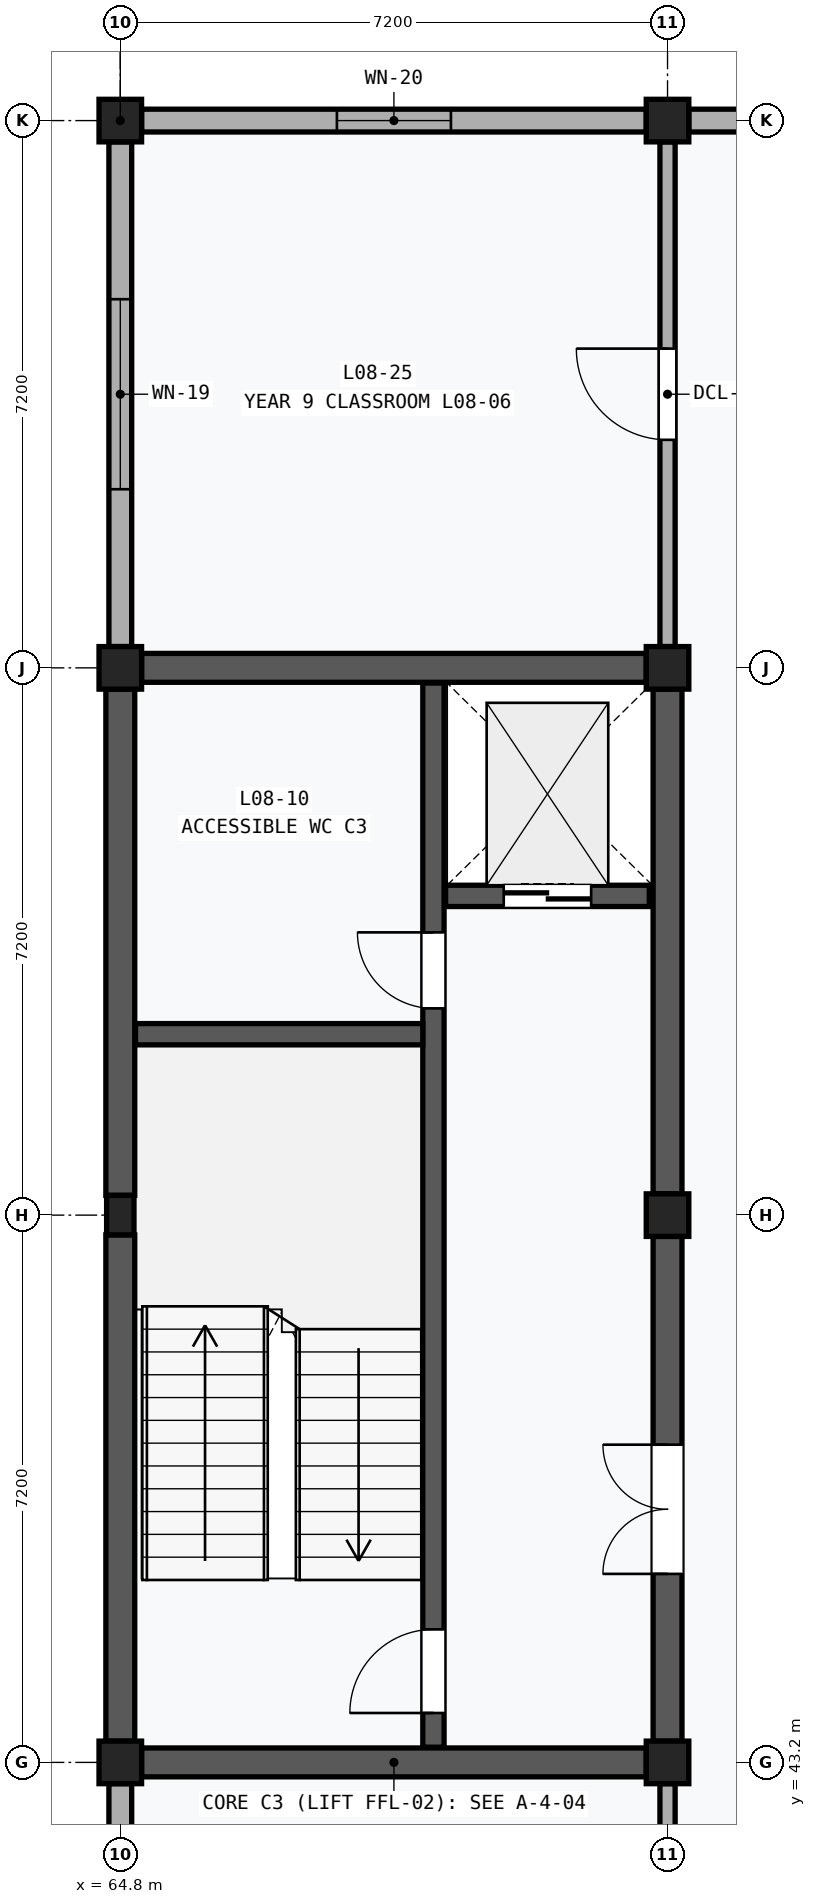
"""IFC4 building model, lengths in metres.
Left out: names, types, materials, properties, quantities, classifications, styles, units other than length and angle.
Written with IfcOpenShell. Run it as: python <this file> out.ifc"""

import sys

from ifc_helpers import new_model, si_unit, direction, frame, frame_2d, origin, origin_2d, place, context, subcontext, project, spatial, rectangle, extrude, element, fill, save


model = new_model("IFC4")
c1 = context("Model", 3, precision=1e-05, world=origin(), true_north=direction((0.0, 1.0)))
c2 = subcontext(c1, "Body", "Model", "MODEL_VIEW")
j1 = project(units=[si_unit("LENGTHUNIT", "METRE"), si_unit("PLANEANGLEUNIT", "RADIAN")], contexts=[c1])
p1 = place(None, origin())
s1 = spatial("IfcSite", under=j1, at=p1, CompositionType="ELEMENT")
p2 = place(p1, origin())
s2 = spatial("IfcBuilding", under=s1, at=p2, CompositionType="ELEMENT")
p3 = place(p2, frame((0.0, 0.0, 34.8)))
s3 = spatial("IfcBuildingStorey", under=s2, at=p3, CompositionType="ELEMENT", Elevation=34.8)
p4 = place(p3, frame((64.8, 43.2, 0.0), z_axis=(0.0, 0.0, 1.0), x_axis=(1.0, 0.0, 0.0)))
e1 = element("IfcColumn", 1, at=p4, inside=s3, PredefinedType="COLUMN", context=c2, shape_type="SweptSolid", body=[
    extrude(rectangle(XDim=0.56, YDim=0.56, at=origin_2d()), origin(), (0.0, 0.0, 1.0), 4.0),
])
p5 = place(p3, frame((64.8, 50.4, 0.0), z_axis=(0.0, 0.0, 1.0), x_axis=(1.0, 0.0, 0.0)))
e2 = element("IfcColumn", 2, at=p5, inside=s3, PredefinedType="PILASTER", context=c2, shape_type="SweptSolid", body=[
    extrude(rectangle(XDim=0.36, YDim=0.52, at=origin_2d()), origin(), (0.0, 0.0, 1.0), 4.0),
])
for number, where, z_axis, x_axis in (
    (3, (64.8, 57.6, 0.0), (0.0, 0.0, 1.0), (1.0, 0.0, 0.0)),
    (4, (64.8, 64.8, 0.0), (0.0, 0.0, 1.0), (1.0, 0.0, 0.0)),
    (5, (72.0, 43.2, 0.0), (0.0, 0.0, 1.0), (1.0, 0.0, 0.0)),
    (6, (72.0, 50.4, 0.0), (0.0, 0.0, 1.0), (1.0, 0.0, 0.0)),
    (7, (72.0, 57.6, 0.0), (0.0, 0.0, 1.0), (1.0, 0.0, 0.0)),
    (8, (72.0, 64.8, 0.0), (0.0, 0.0, 1.0), (1.0, 0.0, 0.0)),
):
    element("IfcColumn", number, at=place(p3, frame(where, z_axis=z_axis, x_axis=x_axis)), inside=s3, PredefinedType="COLUMN", context=c2, shape_type="SweptSolid", body=[
        extrude(rectangle(XDim=0.56, YDim=0.56, at=origin_2d()), origin(), (0.0, 0.0, 1.0), 4.0),
    ])
p6 = place(p3, frame((64.8, 36.28, 0.0), z_axis=(0.0, 0.0, 1.0), x_axis=(0.0, 1.0, 0.0)))
e9 = element("IfcWall", 9, at=p6, inside=s3, PredefinedType="SOLIDWALL", context=c2, shape_type="SweptSolid", body=[
    extrude(rectangle(XDim=6.64, YDim=0.3, at=frame_2d((3.32, 0.0))), origin(), (0.0, 0.0, 1.0), 3.19),
])
p7 = place(p3, frame((65.08, 64.8, 0.0), z_axis=(0.0, 0.0, 1.0), x_axis=(1.0, 0.0, 0.0)))
e10 = element("IfcWall", 10, at=p7, inside=s3, PredefinedType="SOLIDWALL", context=c2, shape_type="SweptSolid", body=[
    extrude(rectangle(XDim=6.64, YDim=0.3, at=frame_2d((3.32, 0.0))), origin(), (0.0, 0.0, 1.0), 3.19),
])
p8 = place(p7, frame((2.57, 0.0, 1.2)))
e11 = element("IfcOpeningElement", 11, at=p8, cuts=e10, PredefinedType="OPENING", context=c2, shape_type="SweptSolid", body=[
    extrude(rectangle(XDim=1.5, YDim=1.35, at=frame_2d((0.75, 0.675))), frame((0.0, 0.162, 0.0), z_axis=(0.0, -1.0, 0.0), x_axis=(1.0, 0.0, 0.0)), (0.0, 0.0, 1.0), 0.324),
])
p9 = place(p3, frame((64.8, 57.88, 0.0), z_axis=(0.0, 0.0, 1.0), x_axis=(0.0, 1.0, 0.0)))
e12 = element("IfcWall", 12, at=p9, inside=s3, PredefinedType="SOLIDWALL", context=c2, shape_type="SweptSolid", body=[
    extrude(rectangle(XDim=6.64, YDim=0.3, at=frame_2d((3.32, 0.0))), origin(), (0.0, 0.0, 1.0), 3.19),
])
p10 = place(p9, frame((2.07, 0.0, 1.1)))
e13 = element("IfcOpeningElement", 13, at=p10, cuts=e12, PredefinedType="OPENING", context=c2, shape_type="SweptSolid", body=[
    extrude(rectangle(XDim=2.5, YDim=1.5, at=frame_2d((1.25, 0.75))), frame((0.0, 0.162, 0.0), z_axis=(0.0, -1.0, 0.0), x_axis=(1.0, 0.0, 0.0)), (0.0, 0.0, 1.0), 0.324),
])
p11 = place(p3, frame((72.28, 64.8, 0.0), z_axis=(0.0, 0.0, 1.0), x_axis=(1.0, 0.0, 0.0)))
e14 = element("IfcWall", 14, at=p11, inside=s3, PredefinedType="SOLIDWALL", context=c2, shape_type="SweptSolid", body=[
    extrude(rectangle(XDim=6.74, YDim=0.3, at=frame_2d((3.37, 0.0))), origin(), (0.0, 0.0, 1.0), 3.19),
])
p12 = place(p11, frame((2.495, 0.0, 1.2)))
e15 = element("IfcOpeningElement", 15, at=p12, cuts=e14, PredefinedType="OPENING", context=c2, shape_type="SweptSolid", body=[
    extrude(rectangle(XDim=1.75, YDim=1.35, at=frame_2d((0.875, 0.675))), frame((0.0, 0.162, 0.0), z_axis=(0.0, -1.0, 0.0), x_axis=(1.0, 0.0, 0.0)), (0.0, 0.0, 1.0), 0.324),
])
p13 = place(p3, frame((64.8, 43.48, 0.0), z_axis=(0.0, 0.0, 1.0), x_axis=(0.0, 1.0, 0.0)))
e16 = element("IfcWall", 16, at=p13, inside=s3, PredefinedType="SHEAR", context=c2, shape_type="SweptSolid", body=[
    extrude(rectangle(XDim=6.66, YDim=0.38, at=frame_2d((3.33, 0.0))), origin(), (0.0, 0.0, 1.0), 3.19),
])
p14 = place(p3, frame((64.8, 50.66, 0.0), z_axis=(0.0, 0.0, 1.0), x_axis=(0.0, 1.0, 0.0)))
e17 = element("IfcWall", 17, at=p14, inside=s3, PredefinedType="SHEAR", context=c2, shape_type="SweptSolid", body=[
    extrude(rectangle(XDim=6.66, YDim=0.38, at=frame_2d((3.33, 0.0))), origin(), (0.0, 0.0, 1.0), 3.19),
])
p15 = place(p3, frame((72.0, 43.48, 0.0), z_axis=(0.0, 0.0, 1.0), x_axis=(0.0, 1.0, 0.0)))
e18 = element("IfcWall", 18, at=p15, inside=s3, PredefinedType="SHEAR", context=c2, shape_type="SweptSolid", body=[
    extrude(rectangle(XDim=6.64, YDim=0.38, at=frame_2d((3.32, 0.0))), origin(), (0.0, 0.0, 1.0), 3.03),
])
p16 = place(p15, frame((2.2, 0.0, 0.0)))
e19 = element("IfcOpeningElement", 19, at=p16, cuts=e18, PredefinedType="OPENING", context=c2, shape_type="SweptSolid", body=[
    extrude(rectangle(XDim=1.7, YDim=2.25, at=frame_2d((0.85, 1.125))), frame((0.0, 0.202, 0.0), z_axis=(0.0, -1.0, 0.0), x_axis=(1.0, 0.0, 0.0)), (0.0, 0.0, 1.0), 0.404),
])
p17 = place(p3, frame((72.0, 50.68, 0.0), z_axis=(0.0, 0.0, 1.0), x_axis=(0.0, 1.0, 0.0)))
e20 = element("IfcWall", 20, at=p17, inside=s3, PredefinedType="SHEAR", context=c2, shape_type="SweptSolid", body=[
    extrude(rectangle(XDim=6.64, YDim=0.38, at=frame_2d((3.32, 0.0))), origin(), (0.0, 0.0, 1.0), 3.03),
])
for number, where, z_axis, x_axis in (
    (21, (65.08, 43.2, 0.0), (0.0, 0.0, 1.0), (1.0, 0.0, 0.0)),
    (22, (65.08, 57.6, 0.0), (0.0, 0.0, 1.0), (1.0, 0.0, 0.0)),
):
    element("IfcWall", number, at=place(p3, frame(where, z_axis=z_axis, x_axis=x_axis)), inside=s3, PredefinedType="SHEAR", context=c2, shape_type="SweptSolid", body=[
        extrude(rectangle(XDim=6.64, YDim=0.38, at=frame_2d((3.32, 0.0))), origin(), (0.0, 0.0, 1.0), 3.03),
    ])
p18 = place(p3, frame((68.92, 43.4, 0.0), z_axis=(0.0, 0.0, 1.0), x_axis=(0.0, 1.0, 0.0)))
e23 = element("IfcWall", 23, at=p18, inside=s3, PredefinedType="SHEAR", context=c2, shape_type="SweptSolid", body=[
    extrude(rectangle(XDim=14.0, YDim=0.28, at=frame_2d((7.0, 0.0))), origin(), (0.0, 0.0, 1.0), 3.76),
])
p19 = place(p18, frame((0.45, 0.0, 0.0)))
e24 = element("IfcOpeningElement", 24, at=p19, cuts=e23, PredefinedType="OPENING", context=c2, shape_type="SweptSolid", body=[
    extrude(rectangle(XDim=1.1, YDim=2.15, at=frame_2d((0.55, 1.075))), frame((0.0, 0.152, 0.0), z_axis=(0.0, -1.0, 0.0), x_axis=(1.0, 0.0, 0.0)), (0.0, 0.0, 1.0), 0.304),
])
p20 = place(p18, frame((9.72, 0.0, 0.0)))
e25 = element("IfcOpeningElement", 25, at=p20, cuts=e23, PredefinedType="OPENING", context=c2, shape_type="SweptSolid", body=[
    extrude(rectangle(XDim=1.0, YDim=2.15, at=frame_2d((0.5, 1.075))), frame((0.0, 0.152, 0.0), z_axis=(0.0, -1.0, 0.0), x_axis=(1.0, 0.0, 0.0)), (0.0, 0.0, 1.0), 0.304),
])
p21 = place(p3, frame((65.0, 52.78, 0.0), z_axis=(0.0, 0.0, 1.0), x_axis=(1.0, 0.0, 0.0)))
e26 = element("IfcWall", 26, at=p21, inside=s3, PredefinedType="SHEAR", context=c2, shape_type="SweptSolid", body=[
    extrude(rectangle(XDim=3.78, YDim=0.28, at=frame_2d((1.89, 0.0))), origin(), (0.0, 0.0, 1.0), 3.76),
])
p22 = place(p3, frame((69.08, 54.6, 0.0), z_axis=(0.0, 0.0, 1.0), x_axis=(1.0, 0.0, 0.0)))
e27 = element("IfcWall", 27, at=p22, inside=s3, PredefinedType="SHEAR", context=c2, shape_type="SweptSolid", body=[
    extrude(rectangle(XDim=2.68, YDim=0.28, at=frame_2d((1.34, 0.0))), origin(), (0.0, 0.0, 1.0), 3.76),
])
p23 = place(p22, frame((0.765, 0.0, 0.0)))
e28 = element("IfcOpeningElement", 28, at=p23, cuts=e27, PredefinedType="OPENING", context=c2, shape_type="SweptSolid", body=[
    extrude(rectangle(XDim=1.15, YDim=2.2, at=frame_2d((0.575, 1.1))), frame((0.0, 0.152, 0.0), z_axis=(0.0, -1.0, 0.0), x_axis=(1.0, 0.0, 0.0)), (0.0, 0.0, 1.0), 0.304),
])
p24 = place(p3, frame((72.0, 36.28, 0.0), z_axis=(0.0, 0.0, 1.0), x_axis=(0.0, 1.0, 0.0)))
e29 = element("IfcWall", 29, at=p24, inside=s3, PredefinedType="PARTITIONING", context=c2, shape_type="SweptSolid", body=[
    extrude(rectangle(XDim=6.64, YDim=0.2, at=frame_2d((3.32, 0.0))), origin(), (0.0, 0.0, 1.0), 3.03),
])
p25 = place(p3, frame((72.0, 57.88, 0.0), z_axis=(0.0, 0.0, 1.0), x_axis=(0.0, 1.0, 0.0)))
e30 = element("IfcWall", 30, at=p25, inside=s3, PredefinedType="PARTITIONING", context=c2, shape_type="SweptSolid", body=[
    extrude(rectangle(XDim=6.64, YDim=0.2, at=frame_2d((3.32, 0.0))), origin(), (0.0, 0.0, 1.0), 3.03),
])
p26 = place(p25, frame((2.72, 0.0, 0.0)))
e31 = element("IfcOpeningElement", 31, at=p26, cuts=e30, PredefinedType="OPENING", context=c2, shape_type="SweptSolid", body=[
    extrude(rectangle(XDim=1.2, YDim=2.24, at=frame_2d((0.6, 1.12))), frame((0.0, 0.112, 0.0), z_axis=(0.0, -1.0, 0.0), x_axis=(1.0, 0.0, 0.0)), (0.0, 0.0, 1.0), 0.224),
])
p27 = place(p8, origin())
e32 = element("IfcWindow", 32, at=p27, inside=s3, PartitioningType="SINGLE_PANEL", PredefinedType="WINDOW", context=c2, shape_type="SweptSolid", body=[
    extrude(rectangle(XDim=1.5, YDim=1.35, at=frame_2d((0.75, 0.675))), frame((0.0, 0.03, 0.0), z_axis=(0.0, -1.0, 0.0), x_axis=(1.0, 0.0, 0.0)), (0.0, 0.0, 1.0), 0.06),
])
fill(e11, e32)
p28 = place(p10, origin())
e33 = element("IfcWindow", 33, at=p28, inside=s3, PartitioningType="SINGLE_PANEL", PredefinedType="WINDOW", context=c2, shape_type="SweptSolid", body=[
    extrude(rectangle(XDim=2.5, YDim=1.5, at=frame_2d((1.25, 0.75))), frame((0.0, 0.03, 0.0), z_axis=(0.0, -1.0, 0.0), x_axis=(1.0, 0.0, 0.0)), (0.0, 0.0, 1.0), 0.06),
])
fill(e13, e33)
p29 = place(p16, origin())
e34 = element("IfcDoor", 34, at=p29, inside=s3, OperationType="DOUBLE_DOOR_SINGLE_SWING", PredefinedType="DOOR", context=c2, shape_type="SweptSolid", body=[
    extrude(rectangle(XDim=1.7, YDim=2.25, at=frame_2d((0.85, 1.125))), frame((0.0, 0.025, 0.0), z_axis=(0.0, -1.0, 0.0), x_axis=(1.0, 0.0, 0.0)), (0.0, 0.0, 1.0), 0.05),
])
fill(e19, e34)
p30 = place(p19, origin())
e35 = element("IfcDoor", 35, at=p30, inside=s3, OperationType="SINGLE_SWING_LEFT", PredefinedType="DOOR", context=c2, shape_type="SweptSolid", body=[
    extrude(rectangle(XDim=1.1, YDim=2.15, at=frame_2d((0.55, 1.075))), frame((0.0, 0.025, 0.0), z_axis=(0.0, -1.0, 0.0), x_axis=(1.0, 0.0, 0.0)), (0.0, 0.0, 1.0), 0.05),
])
fill(e24, e35)
p31 = place(p20, origin())
e36 = element("IfcDoor", 36, at=p31, inside=s3, OperationType="SINGLE_SWING_RIGHT", PredefinedType="DOOR", context=c2, shape_type="SweptSolid", body=[
    extrude(rectangle(XDim=1.0, YDim=2.15, at=frame_2d((0.5, 1.075))), frame((0.0, 0.025, 0.0), z_axis=(0.0, -1.0, 0.0), x_axis=(1.0, 0.0, 0.0)), (0.0, 0.0, 1.0), 0.05),
])
fill(e25, e36)
p32 = place(p23, frame((1.15, 0.0, 0.0), z_axis=(0.0, 0.0, 1.0), x_axis=(-1.0, 0.0, 0.0)))
e37 = element("IfcDoor", 37, at=p32, inside=s3, OperationType="DOUBLE_DOOR_SLIDING", PredefinedType="DOOR", context=c2, shape_type="SweptSolid", body=[
    extrude(rectangle(XDim=1.15, YDim=2.2, at=frame_2d((0.575, 1.1))), frame((0.0, 0.025, 0.0), z_axis=(0.0, -1.0, 0.0), x_axis=(1.0, 0.0, 0.0)), (0.0, 0.0, 1.0), 0.05),
])
fill(e28, e37)
p33 = place(p26, origin())
e38 = element("IfcDoor", 38, at=p33, inside=s3, OperationType="SINGLE_SWING_RIGHT", PredefinedType="DOOR", context=c2, shape_type="SweptSolid", body=[
    extrude(rectangle(XDim=1.2, YDim=2.24, at=frame_2d((0.6, 1.12))), frame((0.0, 0.025, 0.0), z_axis=(0.0, -1.0, 0.0), x_axis=(1.0, 0.0, 0.0)), (0.0, 0.0, 1.0), 0.05),
])
fill(e31, e38)
save(model, sys.argv[1])
